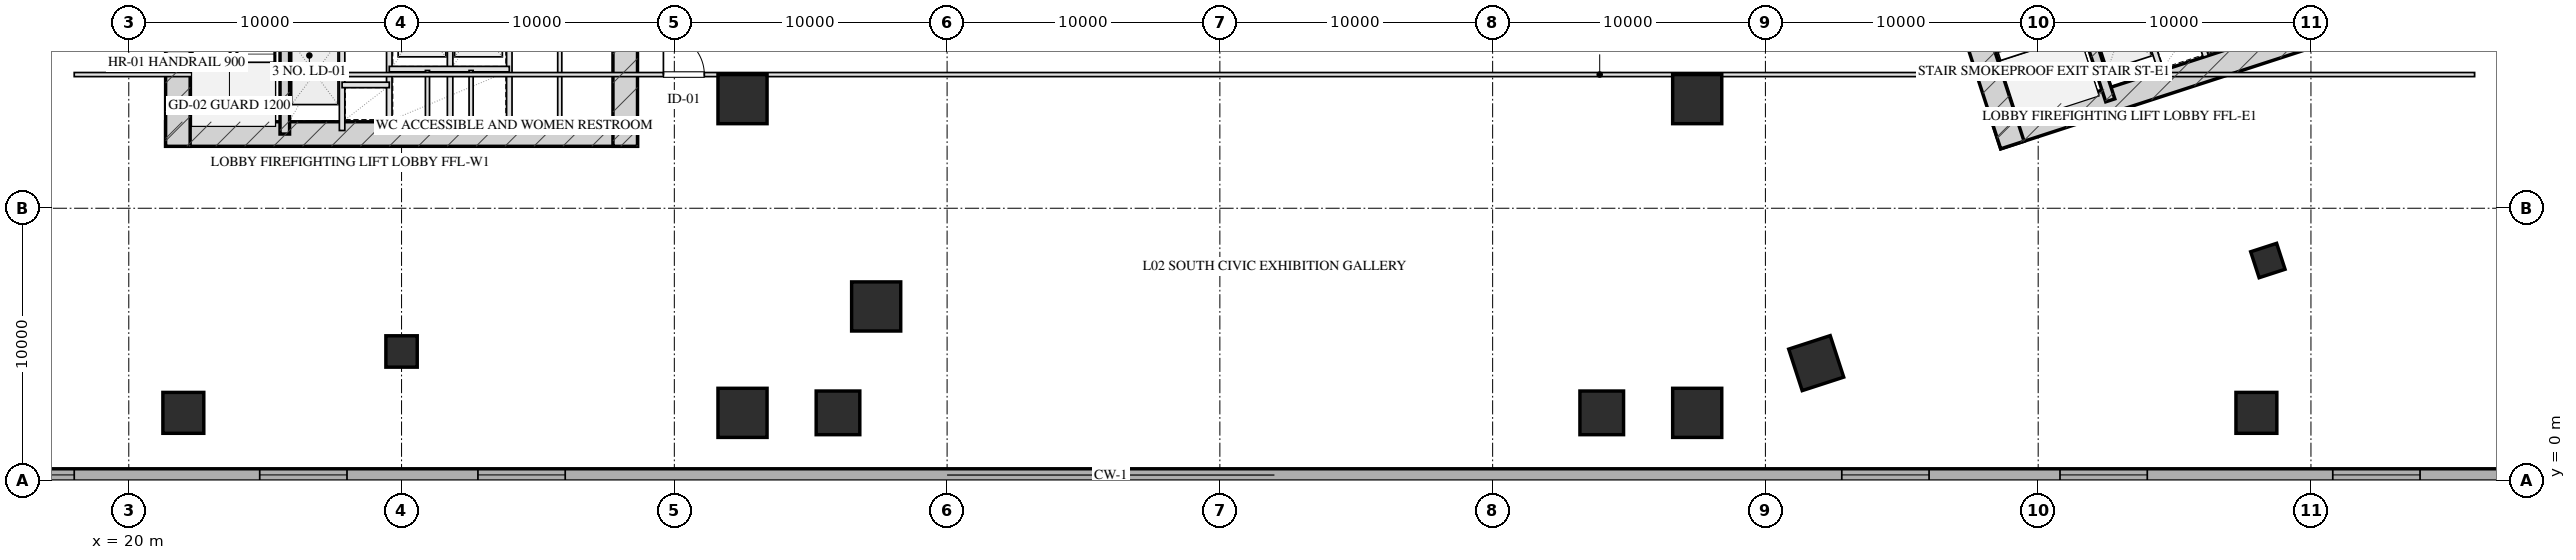
"""IFC4 building model, lengths in metres.
Left out: names, types, materials, properties, quantities, classifications, styles, units other than length and angle.
Written with IfcOpenShell. Run it as: python <this file> out.ifc"""

import sys

from ifc_helpers import new_model, si_unit, direction, frame, frame_2d, origin, origin_2d, place, context, subcontext, project, spatial, rectangle, hollow_rectangle, extrude, element, fill, save


model = new_model("IFC4")
c1 = context("Model", 3, precision=1e-05, world=origin(), true_north=direction((0.0, 1.0)))
c2 = subcontext(c1, "Body", "Model", "MODEL_VIEW")
j1 = project(units=[si_unit("LENGTHUNIT", "METRE"), si_unit("PLANEANGLEUNIT", "RADIAN")], contexts=[c1])
p1 = place(None, origin())
s1 = spatial("IfcSite", under=j1, at=p1, CompositionType="ELEMENT")
p2 = place(p1, origin())
s2 = spatial("IfcBuilding", under=s1, at=p2, CompositionType="ELEMENT")
p3 = place(p2, frame((0.0, 0.0, 11.5)))
s3 = spatial("IfcBuildingStorey", under=s2, at=p3, CompositionType="ELEMENT", Elevation=11.5)
p4 = place(p3, frame((21.35, 12.72, 0.0), z_axis=(0.0, 0.0, 1.0), x_axis=(1.0, 0.0, 0.0)))
e1 = element("IfcWall", 1, at=p4, inside=s3, PredefinedType="SHEAR", context=c2, shape_type="SweptSolid", body=[
    extrude(rectangle(XDim=17.3, YDim=0.9, at=frame_2d((8.65, 0.0))), origin(), (0.0, 0.0, 1.0), 5.0),
])
for number, where, z_axis, x_axis in (
    (2, (21.8, 22.05, 0.0), (0.0, 0.0, 1.0), (0.0, -1.0, 0.0)),
    (3, (38.2, 22.05, 0.0), (0.0, 0.0, 1.0), (0.0, -1.0, 0.0)),
):
    element("IfcWall", number, at=place(p3, frame(where, z_axis=z_axis, x_axis=x_axis)), inside=s3, PredefinedType="SHEAR", context=c2, shape_type="SweptSolid", body=[
        extrude(rectangle(XDim=9.78, YDim=0.9, at=frame_2d((4.89, 0.0))), origin(), (0.0, 0.0, 1.0), 5.0),
    ])
p5 = place(p3, frame((25.72, 19.7, 0.0), z_axis=(0.0, 0.0, 1.0), x_axis=(0.0, -1.0, 0.0)))
e4 = element("IfcWall", 4, at=p5, inside=s3, PredefinedType="SHEAR", context=c2, shape_type="SweptSolid", body=[
    extrude(rectangle(XDim=6.98, YDim=0.35, at=frame_2d((3.49, 0.0))), origin(), (0.0, 0.0, 1.0), 5.0),
])
p6 = place(p3, frame((88.487, 12.605, 0.0), z_axis=(0.0, 0.0, 1.0), x_axis=(0.951055016115, 0.309021611416, 0.0)))
e5 = element("IfcWall", 5, at=p6, inside=s3, PredefinedType="SHEAR", context=c2, shape_type="SweptSolid", body=[
    extrude(rectangle(XDim=16.7, YDim=0.9, at=frame_2d((8.35, 0.0))), origin(), (0.0, 0.0, 1.0), 5.0),
])
p7 = place(p3, frame((86.032, 21.618, 0.0), z_axis=(0.0, 0.0, 1.0), x_axis=(0.30901438634, -0.951057363693, 0.0)))
e6 = element("IfcWall", 6, at=p7, inside=s3, PredefinedType="SHEAR", context=c2, shape_type="SweptSolid", body=[
    extrude(rectangle(XDim=9.78, YDim=0.9, at=frame_2d((4.89, 0.0))), origin(), (0.0, 0.0, 1.0), 5.0),
])
p8 = place(p3, frame((90.486, 20.594, 0.0), z_axis=(0.0, 0.0, 1.0), x_axis=(0.309020428229, -0.951055400562, 0.0)))
e7 = element("IfcWall", 7, at=p8, inside=s3, PredefinedType="SHEAR", context=c2, shape_type="SweptSolid", body=[
    extrude(rectangle(XDim=6.98, YDim=0.35, at=frame_2d((3.49, 0.0))), origin(), (0.0, 0.0, 1.0), 5.0),
])
p9 = place(p3, frame((22.0, 2.5, 0.0), z_axis=(0.0, 0.0, 1.0), x_axis=(1.0, 0.0, 0.0)))
e8 = element("IfcColumn", 8, at=p9, inside=s3, PredefinedType="COLUMN", context=c2, shape_type="SweptSolid", body=[
    extrude(rectangle(XDim=1.5, YDim=1.5, at=origin_2d()), origin(), (0.0, 0.0, 1.0), 5.001),
])
for number, where, z_axis, x_axis in (
    (9, (42.5, 2.5, 0.0), (0.0, 0.0, 1.0), (1.0, 0.0, 0.0)),
    (10, (42.5, 14.0, 0.0), (0.0, 0.0, 1.0), (1.0, 0.0, 0.0)),
    (11, (77.5, 2.5, 0.0), (0.0, 0.0, 1.0), (1.0, 0.0, 0.0)),
    (12, (77.5, 14.0, 0.0), (0.0, 0.0, 1.0), (1.0, 0.0, 0.0)),
):
    element("IfcColumn", number, at=place(p3, frame(where, z_axis=z_axis, x_axis=x_axis)), inside=s3, PredefinedType="COLUMN", context=c2, shape_type="SweptSolid", body=[
        extrude(hollow_rectangle(XDim=1.8, YDim=1.8, WallThickness=0.06, at=origin_2d()), origin(), (0.0, 0.0, 1.0), 5.001),
    ])
p10 = place(p3, frame((98.0, 2.5, 0.0), z_axis=(0.0, 0.0, 1.0), x_axis=(1.0, 0.0, 0.0)))
e13 = element("IfcColumn", 13, at=p10, inside=s3, PredefinedType="COLUMN", context=c2, shape_type="SweptSolid", body=[
    extrude(rectangle(XDim=1.5, YDim=1.5, at=origin_2d()), origin(), (0.0, 0.0, 1.0), 5.001),
])
for number, where, z_axis, x_axis in (
    (14, (46.0, 2.5, 0.0), (0.0, 0.0, 1.0), (1.0, 0.0, 0.0)),
    (15, (74.0, 2.5, 0.0), (0.0, 0.0, 1.0), (1.0, 0.0, 0.0)),
):
    element("IfcColumn", number, at=place(p3, frame(where, z_axis=z_axis, x_axis=x_axis)), inside=s3, PredefinedType="COLUMN", context=c2, shape_type="SweptSolid", body=[
        extrude(hollow_rectangle(XDim=1.6, YDim=1.6, WallThickness=0.055, at=origin_2d()), origin(), (0.0, 0.0, 1.0), 5.001),
    ])
p11 = place(p3, frame((47.4, 6.4, 0.0), z_axis=(0.0, 0.0, 1.0), x_axis=(1.0, 0.0, 0.0)))
e16 = element("IfcColumn", 16, at=p11, inside=s3, PredefinedType="COLUMN", context=c2, shape_type="SweptSolid", body=[
    extrude(hollow_rectangle(XDim=1.8, YDim=1.8, WallThickness=0.06, at=origin_2d()), origin(), (0.0, 0.0, 1.0), 5.001),
])
p12 = place(p3, frame((30.0, 4.75, 0.0), z_axis=(0.0, 0.0, 1.0), x_axis=(1.0, 0.0, 0.0)))
e17 = element("IfcColumn", 17, at=p12, inside=s3, PredefinedType="COLUMN", context=c2, shape_type="SweptSolid", body=[
    extrude(hollow_rectangle(XDim=1.15, YDim=1.15, WallThickness=0.04, at=origin_2d()), origin(), (0.0, 0.0, 1.0), 5.001),
])
p13 = place(p3, frame((81.863, 4.323, 0.0), z_axis=(0.0, 0.0, 1.0), x_axis=(0.951056516295, 0.309016994375, 0.0)))
e18 = element("IfcColumn", 18, at=p13, inside=s3, PredefinedType="COLUMN", context=c2, shape_type="SweptSolid", body=[
    extrude(hollow_rectangle(XDim=1.6, YDim=1.6, WallThickness=0.055, at=origin_2d()), origin(), (0.0, 0.0, 1.0), 5.001),
])
p14 = place(p3, frame((98.421, 8.084, 0.0), z_axis=(0.0, 0.0, 1.0), x_axis=(0.951056516295, 0.309016994375, 0.0)))
e19 = element("IfcColumn", 19, at=p14, inside=s3, PredefinedType="COLUMN", context=c2, shape_type="SweptSolid", body=[
    extrude(hollow_rectangle(XDim=1.0, YDim=1.0, WallThickness=0.036, at=origin_2d()), origin(), (0.0, 0.0, 1.0), 5.001),
])
p15 = place(p3, frame((120.0, 0.225, 0.0), z_axis=(0.0, 0.0, 1.0), x_axis=(-1.0, 0.0, 0.0)))
e20 = element("IfcWall", 20, at=p15, inside=s3, PredefinedType="SOLIDWALL", context=c2, shape_type="SweptSolid", body=[
    extrude(rectangle(XDim=120.0, YDim=0.45, at=frame_2d((60.0, 0.0))), origin(), (0.0, 0.0, 1.0), 4.7),
])
p16 = place(p15, frame((8.0, 0.0, 0.7)))
e21 = element("IfcOpeningElement", 21, at=p16, cuts=e20, PredefinedType="OPENING", context=c2, shape_type="SweptSolid", body=[
    extrude(rectangle(XDim=3.2, YDim=2.05, at=frame_2d((1.6, 1.025))), frame((0.0, 0.235, 0.0), z_axis=(0.0, -1.0, 0.0), x_axis=(1.0, 0.0, 0.0)), (0.0, 0.0, 1.0), 0.47),
])
p17 = place(p15, frame((16.0, 0.0, 0.7)))
e22 = element("IfcOpeningElement", 22, at=p17, cuts=e20, PredefinedType="OPENING", context=c2, shape_type="SweptSolid", body=[
    extrude(rectangle(XDim=3.2, YDim=2.05, at=frame_2d((1.6, 1.025))), frame((0.0, 0.235, 0.0), z_axis=(0.0, -1.0, 0.0), x_axis=(1.0, 0.0, 0.0)), (0.0, 0.0, 1.0), 0.47),
])
p18 = place(p15, frame((26.0, 0.0, 0.7)))
e23 = element("IfcOpeningElement", 23, at=p18, cuts=e20, PredefinedType="OPENING", context=c2, shape_type="SweptSolid", body=[
    extrude(rectangle(XDim=3.2, YDim=2.05, at=frame_2d((1.6, 1.025))), frame((0.0, 0.235, 0.0), z_axis=(0.0, -1.0, 0.0), x_axis=(1.0, 0.0, 0.0)), (0.0, 0.0, 1.0), 0.47),
])
p19 = place(p15, frame((34.0, 0.0, 0.7)))
e24 = element("IfcOpeningElement", 24, at=p19, cuts=e20, PredefinedType="OPENING", context=c2, shape_type="SweptSolid", body=[
    extrude(rectangle(XDim=3.2, YDim=2.05, at=frame_2d((1.6, 1.025))), frame((0.0, 0.235, 0.0), z_axis=(0.0, -1.0, 0.0), x_axis=(1.0, 0.0, 0.0)), (0.0, 0.0, 1.0), 0.47),
])
p20 = place(p15, frame((84.0, 0.0, 0.7)))
e25 = element("IfcOpeningElement", 25, at=p20, cuts=e20, PredefinedType="OPENING", context=c2, shape_type="SweptSolid", body=[
    extrude(rectangle(XDim=3.2, YDim=2.05, at=frame_2d((1.6, 1.025))), frame((0.0, 0.235, 0.0), z_axis=(0.0, -1.0, 0.0), x_axis=(1.0, 0.0, 0.0)), (0.0, 0.0, 1.0), 0.47),
])
p21 = place(p15, frame((92.0, 0.0, 0.7)))
e26 = element("IfcOpeningElement", 26, at=p21, cuts=e20, PredefinedType="OPENING", context=c2, shape_type="SweptSolid", body=[
    extrude(rectangle(XDim=3.2, YDim=2.05, at=frame_2d((1.6, 1.025))), frame((0.0, 0.235, 0.0), z_axis=(0.0, -1.0, 0.0), x_axis=(1.0, 0.0, 0.0)), (0.0, 0.0, 1.0), 0.47),
])
p22 = place(p15, frame((102.0, 0.0, 0.7)))
e27 = element("IfcOpeningElement", 27, at=p22, cuts=e20, PredefinedType="OPENING", context=c2, shape_type="SweptSolid", body=[
    extrude(rectangle(XDim=3.2, YDim=2.05, at=frame_2d((1.6, 1.025))), frame((0.0, 0.235, 0.0), z_axis=(0.0, -1.0, 0.0), x_axis=(1.0, 0.0, 0.0)), (0.0, 0.0, 1.0), 0.47),
])
p23 = place(p15, frame((110.0, 0.0, 0.7)))
e28 = element("IfcOpeningElement", 28, at=p23, cuts=e20, PredefinedType="OPENING", context=c2, shape_type="SweptSolid", body=[
    extrude(rectangle(XDim=3.2, YDim=2.05, at=frame_2d((1.6, 1.025))), frame((0.0, 0.235, 0.0), z_axis=(0.0, -1.0, 0.0), x_axis=(1.0, 0.0, 0.0)), (0.0, 0.0, 1.0), 0.47),
])
p24 = place(p3, frame((29.55, 21.6, 0.0), z_axis=(0.0, 0.0, 1.0), x_axis=(0.0, -1.0, 0.0)))
e29 = element("IfcWall", 29, at=p24, inside=s3, PredefinedType="PARTITIONING", context=c2, shape_type="SweptSolid", body=[
    extrude(rectangle(XDim=8.43, YDim=0.2, at=frame_2d((4.215, 0.0))), origin(), (0.0, 0.0, 1.0), 4.685),
])
p25 = place(p3, frame((27.82, 16.55, 0.0), z_axis=(0.0, 0.0, 1.0), x_axis=(0.0, -1.0, 0.0)))
e30 = element("IfcWall", 30, at=p25, inside=s3, PredefinedType="PARTITIONING", context=c2, shape_type="SweptSolid", body=[
    extrude(rectangle(XDim=3.7, YDim=0.2, at=frame_2d((1.85, 0.0))), origin(), (0.0, 0.0, 1.0), 4.685),
])
p26 = place(p3, frame((27.82, 14.52, 0.0), z_axis=(0.0, 0.0, 1.0), x_axis=(1.0, 0.0, 0.0)))
e31 = element("IfcWall", 31, at=p26, inside=s3, PredefinedType="PARTITIONING", context=c2, shape_type="SweptSolid", body=[
    extrude(rectangle(XDim=1.73, YDim=0.2, at=frame_2d((0.865, 0.0))), origin(), (0.0, 0.0, 1.0), 4.685),
])
p27 = place(p3, frame((33.95, 21.6, 0.0), z_axis=(0.0, 0.0, 1.0), x_axis=(0.0, -1.0, 0.0)))
e32 = element("IfcWall", 32, at=p27, inside=s3, PredefinedType="PARTITIONING", context=c2, shape_type="SweptSolid", body=[
    extrude(rectangle(XDim=8.43, YDim=0.2, at=frame_2d((4.215, 0.0))), origin(), (0.0, 0.0, 1.0), 4.685),
])
p28 = place(p3, frame((31.78, 18.12, 0.0), z_axis=(0.0, 0.0, 1.0), x_axis=(0.0, -1.0, 0.0)))
e33 = element("IfcWall", 33, at=p28, inside=s3, PredefinedType="PARTITIONING", context=c2, shape_type="SweptSolid", body=[
    extrude(rectangle(XDim=4.95, YDim=0.2, at=frame_2d((2.475, 0.0))), origin(), (0.0, 0.0, 1.0), 4.685),
])
p29 = place(p3, frame((29.55, 15.1, 0.0), z_axis=(0.0, 0.0, 1.0), x_axis=(1.0, 0.0, 0.0)))
e34 = element("IfcWall", 34, at=p29, inside=s3, PredefinedType="PARTITIONING", context=c2, shape_type="SweptSolid", body=[
    extrude(rectangle(XDim=4.4, YDim=0.2, at=frame_2d((2.2, 0.0))), origin(), (0.0, 0.0, 1.0), 4.685),
])
for number, where, z_axis, x_axis in (
    (35, (30.95, 15.05, 0.0), (0.0, 0.0, 1.0), (0.0, -1.0, 0.0)),
    (36, (32.55, 15.05, 0.0), (0.0, 0.0, 1.0), (0.0, -1.0, 0.0)),
):
    element("IfcWall", number, at=place(p3, frame(where, z_axis=z_axis, x_axis=x_axis)), inside=s3, PredefinedType="PARTITIONING", context=c2, shape_type="SweptSolid", body=[
        extrude(rectangle(XDim=1.88, YDim=0.15, at=frame_2d((0.94, 0.0))), origin(), (0.0, 0.0, 1.0), 4.685),
    ])
p30 = place(p3, frame((35.8, 18.9, 0.0), z_axis=(0.0, 0.0, 1.0), x_axis=(0.0, -1.0, 0.0)))
e37 = element("IfcWall", 37, at=p30, inside=s3, PredefinedType="PARTITIONING", context=c2, shape_type="SweptSolid", body=[
    extrude(rectangle(XDim=5.73, YDim=0.15, at=frame_2d((2.865, 0.0))), origin(), (0.0, 0.0, 1.0), 4.685),
])
p31 = place(p3, frame((93.542, 23.585, 0.0), z_axis=(0.0, 0.0, 1.0), x_axis=(0.309042196757, -0.951048327176, 0.0)))
e38 = element("IfcWall", 38, at=p31, inside=s3, PredefinedType="PARTITIONING", context=c2, shape_type="SweptSolid", body=[
    extrude(rectangle(XDim=8.43, YDim=0.2, at=frame_2d((4.215, 0.0))), origin(), (0.0, 0.0, 1.0), 4.685),
])
p32 = place(p3, frame((93.457, 18.247, 0.0), z_axis=(0.0, 0.0, 1.0), x_axis=(0.3089935693, -0.951064127245, 0.0)))
e39 = element("IfcWall", 39, at=p32, inside=s3, PredefinedType="PARTITIONING", context=c2, shape_type="SweptSolid", body=[
    extrude(rectangle(XDim=3.7, YDim=0.2, at=frame_2d((1.85, 0.0))), origin(), (0.0, 0.0, 1.0), 4.685),
])
p33 = place(p3, frame((18.0, 14.9, 0.0), z_axis=(0.0, 0.0, 1.0), x_axis=(1.0, 0.0, 0.0)))
e40 = element("IfcWall", 40, at=p33, inside=s3, PredefinedType="PARTITIONING", context=c2, shape_type="SweptSolid", body=[
    extrude(rectangle(XDim=88.0, YDim=0.15, at=frame_2d((44.0, 0.0))), origin(), (0.0, 0.0, 1.0), 2.15),
])
p34 = place(p33, frame((21.6, 0.0, 0.0)))
e41 = element("IfcOpeningElement", 41, at=p34, cuts=e40, PredefinedType="OPENING", context=c2, shape_type="SweptSolid", body=[
    extrude(rectangle(XDim=1.5, YDim=2.05, at=frame_2d((0.75, 1.025))), frame((0.0, 0.085, 0.0), z_axis=(0.0, -1.0, 0.0), x_axis=(1.0, 0.0, 0.0)), (0.0, 0.0, 1.0), 0.17),
])
p35 = place(p17, origin())
e42 = element("IfcWindow", 42, at=p35, inside=s3, PartitioningType="TRIPLE_PANEL_VERTICAL", PredefinedType="WINDOW", context=c2, shape_type="SweptSolid", body=[
    extrude(rectangle(XDim=3.2, YDim=2.05, at=frame_2d((1.6, 1.025))), frame((0.0, 0.03, 0.0), z_axis=(0.0, -1.0, 0.0), x_axis=(1.0, 0.0, 0.0)), (0.0, 0.0, 1.0), 0.06),
])
fill(e22, e42)
p36 = place(p18, origin())
e43 = element("IfcWindow", 43, at=p36, inside=s3, PartitioningType="TRIPLE_PANEL_VERTICAL", PredefinedType="WINDOW", context=c2, shape_type="SweptSolid", body=[
    extrude(rectangle(XDim=3.2, YDim=2.05, at=frame_2d((1.6, 1.025))), frame((0.0, 0.03, 0.0), z_axis=(0.0, -1.0, 0.0), x_axis=(1.0, 0.0, 0.0)), (0.0, 0.0, 1.0), 0.06),
])
fill(e23, e43)
p37 = place(p19, origin())
e44 = element("IfcWindow", 44, at=p37, inside=s3, PartitioningType="TRIPLE_PANEL_VERTICAL", PredefinedType="WINDOW", context=c2, shape_type="SweptSolid", body=[
    extrude(rectangle(XDim=3.2, YDim=2.05, at=frame_2d((1.6, 1.025))), frame((0.0, 0.03, 0.0), z_axis=(0.0, -1.0, 0.0), x_axis=(1.0, 0.0, 0.0)), (0.0, 0.0, 1.0), 0.06),
])
fill(e24, e44)
p38 = place(p20, origin())
e45 = element("IfcWindow", 45, at=p38, inside=s3, PartitioningType="TRIPLE_PANEL_VERTICAL", PredefinedType="WINDOW", context=c2, shape_type="SweptSolid", body=[
    extrude(rectangle(XDim=3.2, YDim=2.05, at=frame_2d((1.6, 1.025))), frame((0.0, 0.03, 0.0), z_axis=(0.0, -1.0, 0.0), x_axis=(1.0, 0.0, 0.0)), (0.0, 0.0, 1.0), 0.06),
])
fill(e25, e45)
p39 = place(p21, origin())
e46 = element("IfcWindow", 46, at=p39, inside=s3, PartitioningType="TRIPLE_PANEL_VERTICAL", PredefinedType="WINDOW", context=c2, shape_type="SweptSolid", body=[
    extrude(rectangle(XDim=3.2, YDim=2.05, at=frame_2d((1.6, 1.025))), frame((0.0, 0.03, 0.0), z_axis=(0.0, -1.0, 0.0), x_axis=(1.0, 0.0, 0.0)), (0.0, 0.0, 1.0), 0.06),
])
fill(e26, e46)
p40 = place(p22, origin())
e47 = element("IfcWindow", 47, at=p40, inside=s3, PartitioningType="TRIPLE_PANEL_VERTICAL", PredefinedType="WINDOW", context=c2, shape_type="SweptSolid", body=[
    extrude(rectangle(XDim=3.2, YDim=2.05, at=frame_2d((1.6, 1.025))), frame((0.0, 0.03, 0.0), z_axis=(0.0, -1.0, 0.0), x_axis=(1.0, 0.0, 0.0)), (0.0, 0.0, 1.0), 0.06),
])
fill(e27, e47)
p41 = place(p34, origin())
e48 = element("IfcDoor", 48, at=p41, inside=s3, OperationType="SINGLE_SWING_LEFT", PredefinedType="DOOR", context=c2, shape_type="SweptSolid", body=[
    extrude(rectangle(XDim=1.5, YDim=2.05, at=frame_2d((0.75, 1.025))), frame((0.0, 0.025, 0.0), z_axis=(0.0, -1.0, 0.0), x_axis=(1.0, 0.0, 0.0)), (0.0, 0.0, 1.0), 0.05),
])
fill(e41, e48)
save(model, sys.argv[1])
